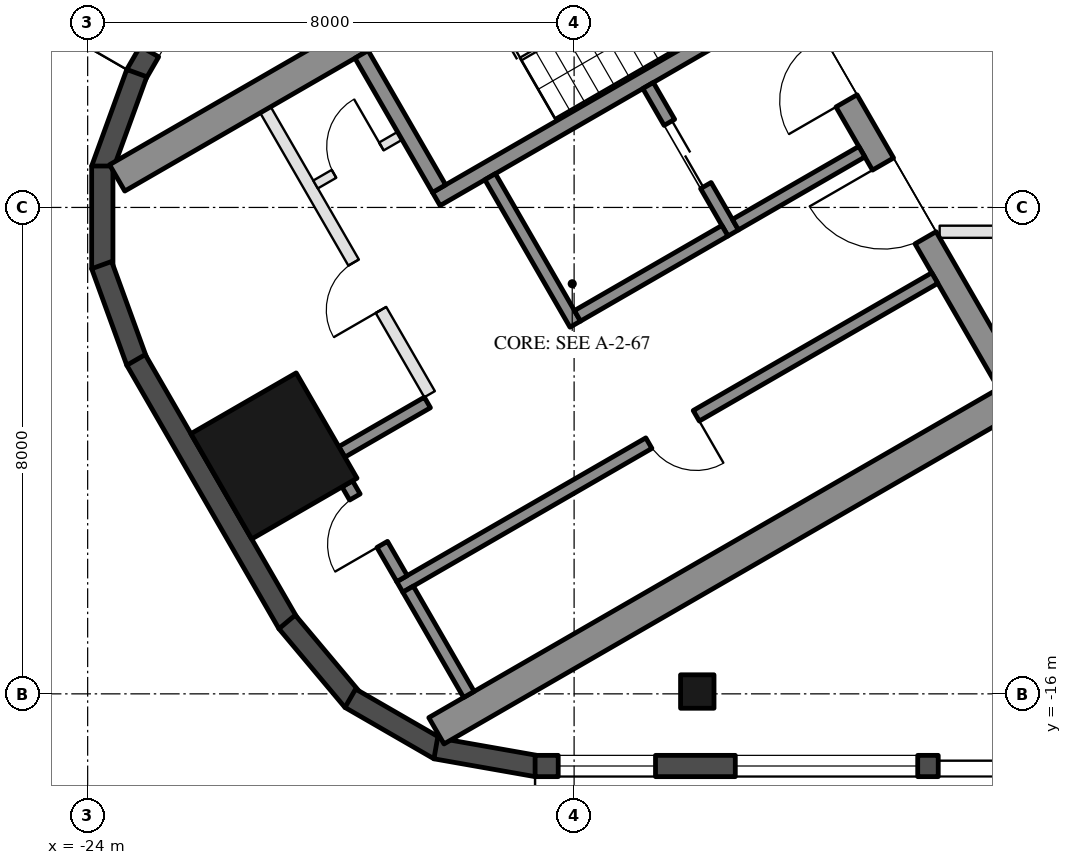
"""IFC4 building model, lengths in metres.
Left out: names, types, materials, properties, quantities, classifications, styles, units other than length and angle.
Written with IfcOpenShell. Run it as: python <this file> out.ifc"""

import sys

from ifc_helpers import new_model, si_unit, direction, frame, frame_2d, origin, origin_2d, place, context, subcontext, project, spatial, rectangle, hollow_rectangle, extrude, boolean, halfspace, element, fill, save


model = new_model("IFC4")
c1 = context("Model", 3, precision=1e-05, world=origin(), true_north=direction((0.0, 1.0)))
c2 = subcontext(c1, "Body", "Model", "MODEL_VIEW")
j1 = project(units=[si_unit("LENGTHUNIT", "METRE"), si_unit("PLANEANGLEUNIT", "RADIAN")], contexts=[c1])
p1 = place(None, origin())
s1 = spatial("IfcSite", under=j1, at=p1, CompositionType="ELEMENT")
p2 = place(p1, origin())
s2 = spatial("IfcBuilding", under=s1, at=p2, CompositionType="ELEMENT")
p3 = place(p2, frame((0.0, 0.0, 291.1)))
s3 = spatial("IfcBuildingStorey", under=s2, at=p3, CompositionType="ELEMENT", Elevation=291.1)
p4 = place(p3, frame((-13.974, -15.962, 0.0), z_axis=(0.0, 0.0, 1.0), x_axis=(-1.0, 0.0, 0.0)))
e1 = element("IfcColumn", 1, at=p4, inside=s3, PredefinedType="COLUMN", context=c2, shape_type="SweptSolid", body=[
    boolean("DIFFERENCE", extrude(hollow_rectangle(XDim=0.55, YDim=0.55, WallThickness=0.025, at=origin_2d()), origin(), (0.0, 0.0, 1.0), 3.7), halfspace(frame((0.0, 0.0, 0.04), z_axis=(0.0, 0.0, 1.0), x_axis=(1.0, 0.0, 0.0)), True)),
])
p5 = place(p3, frame((-20.936, -12.087, 0.0), z_axis=(0.0, 0.0, 1.0), x_axis=(-0.5, 0.866025403784, 0.0)))
e2 = element("IfcColumn", 2, at=p5, inside=s3, PredefinedType="COLUMN", context=c2, shape_type="SweptSolid", body=[
    boolean("DIFFERENCE", extrude(hollow_rectangle(XDim=2.0, YDim=2.0, WallThickness=0.05, at=origin_2d()), origin(), (0.0, 0.0, 1.0), 3.7), halfspace(frame((0.0, 0.0, 0.113), z_axis=(0.0, 0.0, 1.0), x_axis=(1.0, 0.0, 0.0)), True)),
])
p6 = place(p3, frame((-21.421, -2.729, 0.0), z_axis=(0.0, 0.0, 1.0), x_axis=(-0.500040399856, -0.86600207766, 0.0)))
e3 = element("IfcWall", 3, at=p6, inside=s3, PredefinedType="SOLIDWALL", context=c2, shape_type="SweptSolid", body=[
    extrude(rectangle(XDim=3.567, YDim=0.35, at=frame_2d((1.784, 0.0))), origin(), (0.0, 0.0, 1.0), 3.55),
])
p7 = place(p6, frame((1.525, 0.0, 0.3)))
e4 = element("IfcOpeningElement", 4, at=p7, cuts=e3, PredefinedType="OPENING", context=c2, shape_type="SweptSolid", body=[
    extrude(rectangle(XDim=1.6, YDim=2.65, at=frame_2d((0.8, 1.325))), frame((0.0, 0.185, 0.0), z_axis=(0.0, -1.0, 0.0), x_axis=(1.0, 0.0, 0.0)), (0.0, 0.0, 1.0), 0.37),
])
for number, where, z_axis, x_axis in (
    (5, (-23.192, -5.791, 0.0), (0.0, 0.0, 1.0), (-0.342, -0.94, 0.0)),
    (6, (-23.759, -7.319, 0.0), (0.0, 0.0, 1.0), (0.0, -1.0, 0.0)),
    (7, (-23.77, -8.948, 0.0), (0.0, 0.0, 1.0), (0.342, -0.94, 0.0)),
):
    element("IfcWall", number, at=place(p3, frame(where, z_axis=z_axis, x_axis=x_axis)), inside=s3, PredefinedType="SOLIDWALL", context=c2, shape_type="SweptSolid", body=[
        extrude(rectangle(XDim=1.689, YDim=0.35, at=frame_2d((0.845, 0.0))), origin(), (0.0, 0.0, 1.0), 3.55),
    ])
p8 = place(p3, frame((-23.205, -10.508, 0.0), z_axis=(0.0, 0.0, 1.0), x_axis=(0.500016662025, -0.866015783746, 0.0)))
e8 = element("IfcWall", 8, at=p8, inside=s3, PredefinedType="SOLIDWALL", context=c2, shape_type="SweptSolid", body=[
    extrude(rectangle(XDim=5.004, YDim=0.35, at=frame_2d((2.502, 0.0))), origin(), (0.0, 0.0, 1.0), 3.55),
])
p9 = place(p3, frame((-20.72, -14.817, 0.0), z_axis=(0.0, 0.0, 1.0), x_axis=(0.642697100627, -0.766120380127, 0.0)))
e9 = element("IfcWall", 9, at=p9, inside=s3, PredefinedType="SOLIDWALL", context=c2, shape_type="SweptSolid", body=[
    extrude(rectangle(XDim=1.689, YDim=0.35, at=frame_2d((0.845, 0.0))), origin(), (0.0, 0.0, 1.0), 3.55),
])
for number, where, z_axis, x_axis in (
    (10, (-19.681, -16.072, 0.0), (0.0, 0.0, 1.0), (0.866, -0.5, 0.0)),
    (11, (-18.275, -16.896, 0.0), (0.0, 0.0, 1.0), (0.985, -0.174, 0.0)),
):
    element("IfcWall", number, at=place(p3, frame(where, z_axis=z_axis, x_axis=x_axis)), inside=s3, PredefinedType="SOLIDWALL", context=c2, shape_type="SweptSolid", body=[
        extrude(rectangle(XDim=1.689, YDim=0.35, at=frame_2d((0.845, 0.0))), origin(), (0.0, 0.0, 1.0), 3.55),
    ])
p10 = place(p3, frame((-16.642, -17.187, 0.0), z_axis=(0.0, 0.0, 1.0), x_axis=(1.0, 0.0, 0.0)))
e12 = element("IfcWall", 12, at=p10, inside=s3, PredefinedType="SOLIDWALL", context=c2, shape_type="SweptSolid", body=[
    extrude(rectangle(XDim=10.554, YDim=0.35, at=frame_2d((5.277, 0.0))), origin(), (0.0, 0.0, 1.0), 3.55),
])
p11 = place(p10, frame((0.38, 0.0, 0.3)))
e13 = element("IfcOpeningElement", 13, at=p11, cuts=e12, PredefinedType="OPENING", context=c2, shape_type="SweptSolid", body=[
    extrude(rectangle(XDim=1.6, YDim=2.65, at=frame_2d((0.8, 1.325))), frame((0.0, 0.185, 0.0), z_axis=(0.0, -1.0, 0.0), x_axis=(1.0, 0.0, 0.0)), (0.0, 0.0, 1.0), 0.37),
])
p12 = place(p10, frame((6.63, 0.0, 0.0)))
e14 = element("IfcOpeningElement", 14, at=p12, cuts=e12, PredefinedType="OPENING", context=c2, shape_type="SweptSolid", body=[
    extrude(rectangle(XDim=2.4, YDim=2.4, at=frame_2d((1.2, 1.2))), frame((0.0, 0.185, 0.0), z_axis=(0.0, -1.0, 0.0), x_axis=(1.0, 0.0, 0.0)), (0.0, 0.0, 1.0), 0.37),
])
p13 = place(p10, frame((3.292, 0.0, 0.3)))
e15 = element("IfcOpeningElement", 15, at=p13, cuts=e12, PredefinedType="OPENING", context=c2, shape_type="SweptSolid", body=[
    extrude(rectangle(XDim=3.0, YDim=2.65, at=frame_2d((1.5, 1.325))), frame((0.0, 0.185, 0.0), z_axis=(0.0, -1.0, 0.0), x_axis=(1.0, 0.0, 0.0)), (0.0, 0.0, 1.0), 0.37),
])
for number, where, z_axis, x_axis in (
    (16, (-13.797, -1.903, 0.0), (0.0, 0.0, 1.0), (-0.866, -0.5, 0.0)),
    (17, (-8.547, -10.997, 0.0), (0.0, 0.0, 1.0), (-0.866, -0.5, 0.0)),
):
    element("IfcWall", number, at=place(p3, frame(where, z_axis=z_axis, x_axis=x_axis)), inside=s3, PredefinedType="SHEAR", context=c2, shape_type="SweptSolid", body=[
        extrude(rectangle(XDim=11.222, YDim=0.5, at=frame_2d((5.611, 0.0))), origin(), (0.0, 0.0, 1.0), 3.5),
    ])
p14 = place(p3, frame((-13.845, -2.22, 0.0), z_axis=(0.0, 0.0, 1.0), x_axis=(0.500004234368, -0.866022959057, 0.0)))
e18 = element("IfcWall", 18, at=p14, inside=s3, PredefinedType="SHEAR", context=c2, shape_type="SweptSolid", body=[
    extrude(rectangle(XDim=10.0, YDim=0.4, at=frame_2d((5.0, 0.0))), origin(), (0.0, 0.0, 1.0), 3.5),
])
p15 = place(p14, frame((3.55, 0.0, 0.0)))
e19 = element("IfcOpeningElement", 19, at=p15, cuts=e18, PredefinedType="OPENING", context=c2, shape_type="SweptSolid", body=[
    extrude(rectangle(XDim=1.1, YDim=2.1, at=frame_2d((0.55, 1.05))), frame((0.0, 0.21, 0.0), z_axis=(0.0, -1.0, 0.0), x_axis=(1.0, 0.0, 0.0)), (0.0, 0.0, 1.0), 0.42),
])
p16 = place(p14, frame((5.85, 0.0, 0.0)))
e20 = element("IfcOpeningElement", 20, at=p16, cuts=e18, PredefinedType="OPENING", context=c2, shape_type="SweptSolid", body=[
    extrude(rectangle(XDim=1.4, YDim=2.1, at=frame_2d((0.7, 1.05))), frame((0.0, 0.21, 0.0), z_axis=(0.0, -1.0, 0.0), x_axis=(1.0, 0.0, 0.0)), (0.0, 0.0, 1.0), 0.42),
])
p17 = place(p3, frame((-12.681, -4.636, 0.0), z_axis=(0.0, 0.0, 1.0), x_axis=(-0.866021702275, -0.500006411147, 0.0)))
e21 = element("IfcWall", 21, at=p17, inside=s3, PredefinedType="SHEAR", context=c2, shape_type="SweptSolid", body=[
    extrude(rectangle(XDim=6.45, YDim=0.25, at=frame_2d((3.225, 0.0))), origin(), (0.0, 0.0, 1.0), 3.5),
])
p18 = place(p17, frame((0.3, 0.0, 0.0)))
e22 = element("IfcOpeningElement", 22, at=p18, cuts=e21, PredefinedType="OPENING", context=c2, shape_type="SweptSolid", body=[
    extrude(rectangle(XDim=1.0, YDim=2.1, at=frame_2d((0.5, 1.05))), frame((0.0, 0.135, 0.0), z_axis=(0.0, -1.0, 0.0), x_axis=(1.0, 0.0, 0.0)), (0.0, 0.0, 1.0), 0.27),
])
p19 = place(p3, frame((-19.496, -5.482, 0.0), z_axis=(0.0, 0.0, 1.0), x_axis=(0.499990435942, -0.866030925526, 0.0)))
e23 = element("IfcWall", 23, at=p19, inside=s3, PredefinedType="SHEAR", context=c2, shape_type="SweptSolid", body=[
    extrude(rectangle(XDim=2.55, YDim=0.25, at=frame_2d((1.275, 0.0))), origin(), (0.0, 0.0, 1.0), 3.5),
])
p20 = place(p3, frame((-17.381, -7.495, 0.0), z_axis=(0.0, 0.0, 1.0), x_axis=(0.500011755427, -0.866018616679, 0.0)))
e24 = element("IfcWall", 24, at=p20, inside=s3, PredefinedType="SHEAR", context=c2, shape_type="SweptSolid", body=[
    extrude(rectangle(XDim=2.8, YDim=0.2, at=frame_2d((1.4, 0.0))), origin(), (0.0, 0.0, 1.0), 3.5),
])
p21 = place(p3, frame((-14.783, -5.995, 0.0), z_axis=(0.0, 0.0, 1.0), x_axis=(0.49994636267, -0.866056369097, 0.0)))
e25 = element("IfcWall", 25, at=p21, inside=s3, PredefinedType="SHEAR", context=c2, shape_type="SweptSolid", body=[
    extrude(rectangle(XDim=2.8, YDim=0.2, at=frame_2d((1.4, 0.0))), origin(), (0.0, 0.0, 1.0), 3.5),
])
p22 = place(p21, frame((0.7, 0.0, 0.0)))
e26 = element("IfcOpeningElement", 26, at=p22, cuts=e25, PredefinedType="OPENING", context=c2, shape_type="SweptSolid", body=[
    extrude(rectangle(XDim=1.2, YDim=2.1, at=frame_2d((0.6, 1.05))), frame((0.0, 0.11, 0.0), z_axis=(0.0, -1.0, 0.0), x_axis=(1.0, 0.0, 0.0)), (0.0, 0.0, 1.0), 0.22),
])
p23 = place(p3, frame((-13.52, -8.383, 0.0), z_axis=(0.0, 0.0, 1.0), x_axis=(-0.866034573852, -0.49998411664, 0.0)))
e27 = element("IfcWall", 27, at=p23, inside=s3, PredefinedType="SHEAR", context=c2, shape_type="SweptSolid", body=[
    extrude(rectangle(XDim=2.8, YDim=0.2, at=frame_2d((1.4, 0.0))), origin(), (0.0, 0.0, 1.0), 3.5),
])
p24 = place(p3, frame((-11.268, -7.083, 0.0), z_axis=(0.0, 0.0, 1.0), x_axis=(-0.866050077142, -0.499957262057, 0.0)))
e28 = element("IfcWall", 28, at=p24, inside=s3, PredefinedType="SHEAR", context=c2, shape_type="SweptSolid", body=[
    extrude(rectangle(XDim=2.4, YDim=0.2, at=frame_2d((1.2, 0.0))), origin(), (0.0, 0.0, 1.0), 3.5),
])
p25 = place(p3, frame((-10.068, -9.162, 0.0), z_axis=(0.0, 0.0, 1.0), x_axis=(-0.866032725843, -0.499987317609, 0.0)))
e29 = element("IfcWall", 29, at=p25, inside=s3, PredefinedType="SHEAR", context=c2, shape_type="SweptSolid", body=[
    extrude(rectangle(XDim=10.16, YDim=0.2, at=frame_2d((5.08, 0.0))), origin(), (0.0, 0.0, 1.0), 3.5),
])
p26 = place(p25, frame((4.53, 0.0, 0.0)))
e30 = element("IfcOpeningElement", 30, at=p26, cuts=e29, PredefinedType="OPENING", context=c2, shape_type="SweptSolid", body=[
    extrude(rectangle(XDim=0.9, YDim=2.1, at=frame_2d((0.45, 1.05))), frame((0.0, 0.11, 0.0), z_axis=(0.0, -1.0, 0.0), x_axis=(1.0, 0.0, 0.0)), (0.0, 0.0, 1.0), 0.22),
])
p27 = place(p3, frame((-19.73, -12.546, 0.0), z_axis=(0.0, 0.0, 1.0), x_axis=(0.500004188491, -0.866022985545, 0.0)))
e31 = element("IfcWall", 31, at=p27, inside=s3, PredefinedType="SHEAR", context=c2, shape_type="SweptSolid", body=[
    extrude(rectangle(XDim=1.8, YDim=0.2, at=frame_2d((0.9, 0.0))), origin(), (0.0, 0.0, 1.0), 3.5),
])
p28 = place(p27, frame((0.25, 0.0, 0.0)))
e32 = element("IfcOpeningElement", 32, at=p28, cuts=e31, PredefinedType="OPENING", context=c2, shape_type="SweptSolid", body=[
    extrude(rectangle(XDim=0.9, YDim=2.1, at=frame_2d((0.45, 1.05))), frame((0.0, 0.11, 0.0), z_axis=(0.0, -1.0, 0.0), x_axis=(1.0, 0.0, 0.0)), (0.0, 0.0, 1.0), 0.22),
])
p29 = place(p3, frame((-18.413, -11.208, 0.0), z_axis=(0.0, 0.0, 1.0), x_axis=(-0.866053003207, -0.499952193351, 0.0)))
e33 = element("IfcWall", 33, at=p29, inside=s3, PredefinedType="SHEAR", context=c2, shape_type="SweptSolid", body=[
    extrude(rectangle(XDim=1.625, YDim=0.2, at=frame_2d((0.812, 0.0))), origin(), (0.0, 0.0, 1.0), 3.5),
])
p30 = place(p3, frame((-18.73, -14.278, 0.0), z_axis=(0.0, 0.0, 1.0), x_axis=(0.50002537861, -0.866010750942, 0.0)))
e34 = element("IfcWall", 34, at=p30, inside=s3, PredefinedType="SHEAR", context=c2, shape_type="SweptSolid", body=[
    extrude(rectangle(XDim=2.0, YDim=0.2, at=frame_2d((1.0, 0.0))), origin(), (0.0, 0.0, 1.0), 3.5),
])
p31 = place(p3, frame((-21.076, -6.395, 0.0), z_axis=(0.0, 0.0, 1.0), x_axis=(0.50001468107, -0.866016927499, 0.0)))
e35 = element("IfcWall", 35, at=p31, inside=s3, PredefinedType="PARTITIONING", context=c2, shape_type="SweptSolid", body=[
    extrude(rectangle(XDim=5.4, YDim=0.2, at=frame_2d((2.7, 0.0))), origin(), (0.0, 0.0, 1.0), 3.5),
])
p32 = place(p31, frame((2.9, 0.0, 0.0)))
e36 = element("IfcOpeningElement", 36, at=p32, cuts=e35, PredefinedType="OPENING", context=c2, shape_type="SweptSolid", body=[
    extrude(rectangle(XDim=0.9, YDim=2.1, at=frame_2d((0.45, 1.05))), frame((0.0, 0.11, 0.0), z_axis=(0.0, -1.0, 0.0), x_axis=(1.0, 0.0, 0.0)), (0.0, 0.0, 1.0), 0.22),
])
p33 = place(p3, frame((-18.866, -6.822, 0.0), z_axis=(0.0, 0.0, 1.0), x_axis=(-0.866028054938, -0.499995408039, 0.0)))
e37 = element("IfcWall", 37, at=p33, inside=s3, PredefinedType="PARTITIONING", context=c2, shape_type="SweptSolid", body=[
    extrude(rectangle(XDim=1.6, YDim=0.15, at=frame_2d((0.8, 0.0))), origin(), (0.0, 0.0, 1.0), 3.5),
])
p34 = place(p33, frame((0.35, 0.0, 0.0)))
e38 = element("IfcOpeningElement", 38, at=p34, cuts=e37, PredefinedType="OPENING", context=c2, shape_type="SweptSolid", body=[
    extrude(rectangle(XDim=0.9, YDim=2.1, at=frame_2d((0.45, 1.05))), frame((0.0, 0.085, 0.0), z_axis=(0.0, -1.0, 0.0), x_axis=(1.0, 0.0, 0.0)), (0.0, 0.0, 1.0), 0.17),
])
p35 = place(p3, frame((-3.588, -8.4, 0.0), z_axis=(0.0, 0.0, 1.0), x_axis=(-1.0, 0.0, 0.0)))
e39 = element("IfcWall", 39, at=p35, inside=s3, PredefinedType="PARTITIONING", context=c2, shape_type="SweptSolid", body=[
    extrude(rectangle(XDim=6.4, YDim=0.2, at=frame_2d((3.2, 0.0))), origin(), (0.0, 0.0, 1.0), 3.05),
])
p36 = place(p35, frame((2.957, 0.0, 0.0)))
e40 = element("IfcOpeningElement", 40, at=p36, cuts=e39, PredefinedType="OPENING", context=c2, shape_type="SweptSolid", body=[
    extrude(rectangle(XDim=1.0, YDim=2.1, at=frame_2d((0.5, 1.05))), frame((0.0, 0.11, 0.0), z_axis=(0.0, -1.0, 0.0), x_axis=(1.0, 0.0, 0.0)), (0.0, 0.0, 1.0), 0.22),
])
p37 = place(p11, origin())
e41 = element("IfcWindow", 41, at=p37, inside=s3, PartitioningType="SINGLE_PANEL", PredefinedType="WINDOW", context=c2, shape_type="SweptSolid", body=[
    extrude(rectangle(XDim=1.6, YDim=2.65, at=frame_2d((0.8, 1.325))), frame((0.0, 0.03, 0.0), z_axis=(0.0, -1.0, 0.0), x_axis=(1.0, 0.0, 0.0)), (0.0, 0.0, 1.0), 0.06),
])
fill(e13, e41)
p38 = place(p12, frame((2.4, 0.0, 0.0), z_axis=(0.0, 0.0, 1.0), x_axis=(-1.0, 0.0, 0.0)))
e42 = element("IfcDoor", 42, at=p38, inside=s3, OperationType="SLIDING_TO_LEFT", PredefinedType="DOOR", context=c2, shape_type="SweptSolid", body=[
    extrude(rectangle(XDim=2.4, YDim=2.4, at=frame_2d((1.2, 1.2))), frame((0.0, 0.025, 0.0), z_axis=(0.0, -1.0, 0.0), x_axis=(1.0, 0.0, 0.0)), (0.0, 0.0, 1.0), 0.05),
])
fill(e14, e42)
p39 = place(p13, origin())
e43 = element("IfcWindow", 43, at=p39, inside=s3, PartitioningType="SINGLE_PANEL", PredefinedType="WINDOW", context=c2, shape_type="SweptSolid", body=[
    extrude(rectangle(XDim=3.0, YDim=2.65, at=frame_2d((1.5, 1.325))), frame((0.0, 0.03, 0.0), z_axis=(0.0, -1.0, 0.0), x_axis=(1.0, 0.0, 0.0)), (0.0, 0.0, 1.0), 0.06),
])
fill(e15, e43)
p40 = place(p7, origin())
e44 = element("IfcWindow", 44, at=p40, inside=s3, PartitioningType="SINGLE_PANEL", PredefinedType="WINDOW", context=c2, shape_type="SweptSolid", body=[
    extrude(rectangle(XDim=1.6, YDim=2.65, at=frame_2d((0.8, 1.325))), frame((0.0, 0.03, 0.0), z_axis=(0.0, -1.0, 0.0), x_axis=(1.0, 0.0, 0.0)), (0.0, 0.0, 1.0), 0.06),
])
fill(e4, e44)
p41 = place(p22, origin())
e45 = element("IfcDoor", 45, at=p41, inside=s3, OperationType="DOUBLE_DOOR_SLIDING", PredefinedType="DOOR", context=c2, shape_type="SweptSolid", body=[
    extrude(rectangle(XDim=1.2, YDim=2.1, at=frame_2d((0.6, 1.05))), frame((0.0, 0.025, 0.0), z_axis=(0.0, -1.0, 0.0), x_axis=(1.0, 0.0, 0.0)), (0.0, 0.0, 1.0), 0.05),
])
fill(e26, e45)
p42 = place(p34, frame((0.9, 0.0, 0.0), z_axis=(0.0, 0.0, 1.0), x_axis=(-1.0, 0.0, 0.0)))
e46 = element("IfcDoor", 46, at=p42, inside=s3, OperationType="SINGLE_SWING_RIGHT", PredefinedType="DOOR", context=c2, shape_type="SweptSolid", body=[
    extrude(rectangle(XDim=0.9, YDim=2.1, at=frame_2d((0.45, 1.05))), frame((0.0, 0.025, 0.0), z_axis=(0.0, -1.0, 0.0), x_axis=(1.0, 0.0, 0.0)), (0.0, 0.0, 1.0), 0.05),
])
fill(e38, e46)
p43 = place(p26, origin())
e47 = element("IfcDoor", 47, at=p43, inside=s3, OperationType="SINGLE_SWING_LEFT", PredefinedType="DOOR", context=c2, shape_type="SweptSolid", body=[
    extrude(rectangle(XDim=0.9, YDim=2.1, at=frame_2d((0.45, 1.05))), frame((0.0, 0.025, 0.0), z_axis=(0.0, -1.0, 0.0), x_axis=(1.0, 0.0, 0.0)), (0.0, 0.0, 1.0), 0.05),
])
fill(e30, e47)
p44 = place(p28, frame((0.9, 0.0, 0.0), z_axis=(0.0, 0.0, 1.0), x_axis=(-1.0, 0.0, 0.0)))
e48 = element("IfcDoor", 48, at=p44, inside=s3, OperationType="SINGLE_SWING_LEFT", PredefinedType="DOOR", context=c2, shape_type="SweptSolid", body=[
    extrude(rectangle(XDim=0.9, YDim=2.1, at=frame_2d((0.45, 1.05))), frame((0.0, 0.025, 0.0), z_axis=(0.0, -1.0, 0.0), x_axis=(1.0, 0.0, 0.0)), (0.0, 0.0, 1.0), 0.05),
])
fill(e32, e48)
p45 = place(p32, frame((0.9, 0.0, 0.0), z_axis=(0.0, 0.0, 1.0), x_axis=(-1.0, 0.0, 0.0)))
e49 = element("IfcDoor", 49, at=p45, inside=s3, OperationType="SINGLE_SWING_LEFT", PredefinedType="DOOR", context=c2, shape_type="SweptSolid", body=[
    extrude(rectangle(XDim=0.9, YDim=2.1, at=frame_2d((0.45, 1.05))), frame((0.0, 0.025, 0.0), z_axis=(0.0, -1.0, 0.0), x_axis=(1.0, 0.0, 0.0)), (0.0, 0.0, 1.0), 0.05),
])
fill(e36, e49)
p46 = place(p15, frame((1.1, 0.0, 0.0), z_axis=(0.0, 0.0, 1.0), x_axis=(-1.0, 0.0, 0.0)))
e50 = element("IfcDoor", 50, at=p46, inside=s3, OperationType="SINGLE_SWING_LEFT", PredefinedType="DOOR", context=c2, shape_type="SweptSolid", body=[
    extrude(rectangle(XDim=1.1, YDim=2.1, at=frame_2d((0.55, 1.05))), frame((0.0, 0.025, 0.0), z_axis=(0.0, -1.0, 0.0), x_axis=(1.0, 0.0, 0.0)), (0.0, 0.0, 1.0), 0.05),
])
fill(e19, e50)
p47 = place(p16, frame((1.4, 0.0, 0.0), z_axis=(0.0, 0.0, 1.0), x_axis=(-1.0, 0.0, 0.0)))
e51 = element("IfcDoor", 51, at=p47, inside=s3, OperationType="DOUBLE_DOOR_SINGLE_SWING", PredefinedType="DOOR", context=c2, shape_type="SweptSolid", body=[
    extrude(rectangle(XDim=1.4, YDim=2.1, at=frame_2d((0.7, 1.05))), frame((0.0, 0.025, 0.0), z_axis=(0.0, -1.0, 0.0), x_axis=(1.0, 0.0, 0.0)), (0.0, 0.0, 1.0), 0.05),
])
fill(e20, e51)
save(model, sys.argv[1])
